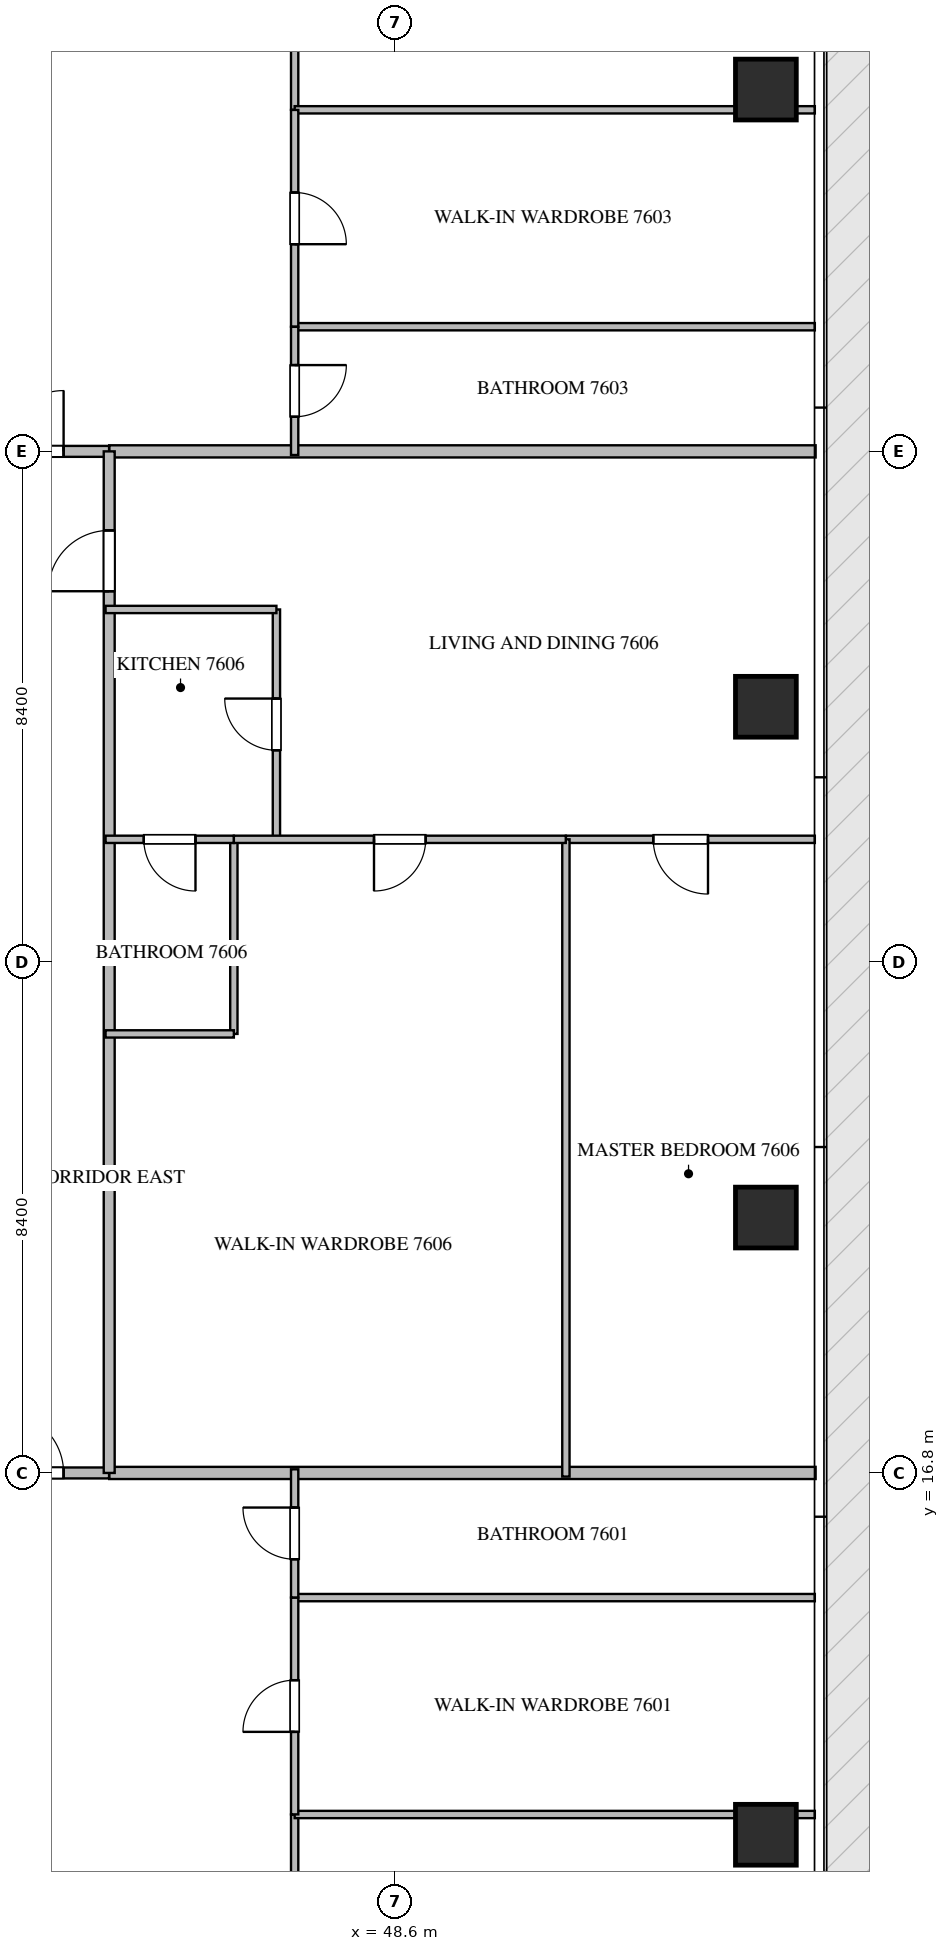
"""IFC4 building model, lengths in metres.
Left out: names, types, materials, properties, quantities, classifications, styles, units other than length and angle.
Written with IfcOpenShell. Run it as: python <this file> out.ifc"""

import sys

from ifc_helpers import new_model, si_unit, direction, frame, frame_2d, origin, origin_2d, place, context, subcontext, project, spatial, rectangle, extrude, source, transform, mapped, element, fill, save


model = new_model("IFC4")
c1 = context("Model", 3, precision=1e-05, world=origin(), true_north=direction((0.0, 1.0)))
c2 = subcontext(c1, "Body", "Model", "MODEL_VIEW")
j1 = project(units=[si_unit("LENGTHUNIT", "METRE"), si_unit("PLANEANGLEUNIT", "RADIAN")], contexts=[c1])
p1 = place(None, origin())
s1 = spatial("IfcSite", under=j1, at=p1, CompositionType="ELEMENT")
p2 = place(p1, origin())
s2 = spatial("IfcBuilding", under=s1, at=p2, CompositionType="ELEMENT")
p3 = place(p2, frame((0.0, 0.0, 305.6)))
s3 = spatial("IfcBuildingStorey", under=s2, at=p3, CompositionType="ELEMENT", Elevation=305.6)
m1 = source(origin(), c2, "Body", "SweptSolid", [
    extrude(rectangle(XDim=1.0, YDim=1.0, at=origin_2d()), origin(), (0.0, 0.0, 1.0), 4.05),
])
for number, where, z_axis, x_axis in (
    (1, (54.7, 10.85, -0.26), (0.0, 0.0, 1.0), (1.0, 0.0, 0.0)),
    (2, (54.7, 21.0, -0.26), (0.0, 0.0, 1.0), (1.0, 0.0, 0.0)),
    (3, (54.7, 29.4, -0.26), (0.0, 0.0, 1.0), (1.0, 0.0, 0.0)),
    (4, (54.7, 39.55, -0.26), (0.0, 0.0, 1.0), (1.0, 0.0, 0.0)),
):
    element("IfcColumn", number, at=place(p3, frame(where, z_axis=z_axis, x_axis=x_axis)), inside=s3, PredefinedType="COLUMN", context=c2, shape_type="MappedRepresentation", body=[
        mapped(m1, transform((0.0, 0.0, 0.0), scale=1.0)),
    ])
for number, where, z_axis, x_axis in (
    (5, (43.9, 16.8, 0.0), (0.0, 0.0, 1.0), (1.0, 0.0, 0.0)),
    (6, (43.9, 33.6, 0.0), (0.0, 0.0, 1.0), (1.0, 0.0, 0.0)),
):
    element("IfcWall", number, at=place(p3, frame(where, z_axis=z_axis, x_axis=x_axis)), inside=s3, PredefinedType="PARTITIONING", context=c2, shape_type="SweptSolid", body=[
        extrude(rectangle(XDim=11.618, YDim=0.2, at=frame_2d((5.809, 0.0))), origin(), (0.0, 0.0, 1.0), 3.79),
    ])
p4 = place(p3, frame((41.402, 16.8, 0.0), z_axis=(0.0, 0.0, 1.0), x_axis=(1.0, 0.0, 0.0)))
e7 = element("IfcWall", 7, at=p4, inside=s3, PredefinedType="PARTITIONING", context=c2, shape_type="SweptSolid", body=[
    extrude(rectangle(XDim=2.496, YDim=0.18, at=frame_2d((1.248, 0.0))), origin(), (0.0, 0.0, 1.0), 3.79),
])
p5 = place(p4, frame((0.748, 0.0, 0.0)))
e8 = element("IfcOpeningElement", 8, at=p5, cuts=e7, PredefinedType="OPENING", context=c2, shape_type="SweptSolid", body=[
    extrude(rectangle(XDim=1.0, YDim=2.15, at=frame_2d((0.5, 1.075))), frame((0.0, 0.1, 0.0), z_axis=(0.0, -1.0, 0.0), x_axis=(1.0, 0.0, 0.0)), (0.0, 0.0, 1.0), 0.2),
])
p6 = place(p3, frame((41.402, 33.6, 0.0), z_axis=(0.0, 0.0, 1.0), x_axis=(1.0, 0.0, 0.0)))
e9 = element("IfcWall", 9, at=p6, inside=s3, PredefinedType="PARTITIONING", context=c2, shape_type="SweptSolid", body=[
    extrude(rectangle(XDim=2.496, YDim=0.18, at=frame_2d((1.248, 0.0))), origin(), (0.0, 0.0, 1.0), 3.79),
])
p7 = place(p6, frame((0.748, 0.0, 0.0)))
e10 = element("IfcOpeningElement", 10, at=p7, cuts=e9, PredefinedType="OPENING", context=c2, shape_type="SweptSolid", body=[
    extrude(rectangle(XDim=1.0, YDim=2.15, at=frame_2d((0.5, 1.075))), frame((0.0, 0.1, 0.0), z_axis=(0.0, -1.0, 0.0), x_axis=(1.0, 0.0, 0.0)), (0.0, 0.0, 1.0), 0.2),
])
p8 = place(p3, frame((43.9, 16.8, 0.0), z_axis=(0.0, 0.0, 1.0), x_axis=(0.0, 1.0, 0.0)))
e11 = element("IfcWall", 11, at=p8, inside=s3, PredefinedType="PARTITIONING", context=c2, shape_type="SweptSolid", body=[
    extrude(rectangle(XDim=16.8, YDim=0.18, at=frame_2d((8.4, 0.0))), origin(), (0.0, 0.0, 1.0), 3.79),
])
p9 = place(p8, frame((14.5, 0.0, 0.0)))
e12 = element("IfcOpeningElement", 12, at=p9, cuts=e11, PredefinedType="OPENING", context=c2, shape_type="SweptSolid", body=[
    extrude(rectangle(XDim=1.0, YDim=2.15, at=frame_2d((0.5, 1.075))), frame((0.0, 0.1, 0.0), z_axis=(0.0, -1.0, 0.0), x_axis=(1.0, 0.0, 0.0)), (0.0, 0.0, 1.0), 0.2),
])
p10 = place(p3, frame((46.95, 2.495, 0.0), z_axis=(0.0, 0.0, 1.0), x_axis=(0.0, 1.0, 0.0)))
e13 = element("IfcWall", 13, at=p10, inside=s3, PredefinedType="PARTITIONING", context=c2, shape_type="SweptSolid", body=[
    extrude(rectangle(XDim=8.688, YDim=0.12, at=frame_2d((4.344, 0.0))), origin(), (0.0, 0.0, 1.0), 3.292),
])
p11 = place(p10, frame((4.283, 0.0, 0.0)))
e14 = element("IfcOpeningElement", 14, at=p11, cuts=e13, PredefinedType="OPENING", context=c2, shape_type="SweptSolid", body=[
    extrude(rectangle(XDim=0.9, YDim=2.1, at=frame_2d((0.45, 1.05))), frame((0.0, 0.07, 0.0), z_axis=(0.0, -1.0, 0.0), x_axis=(1.0, 0.0, 0.0)), (0.0, 0.0, 1.0), 0.14),
])
for number, where, z_axis, x_axis in (
    (15, (46.95, 11.183, 0.0), (0.0, 0.0, 1.0), (1.0, 0.0, 0.0)),
    (16, (46.95, 14.75, 0.0), (0.0, 0.0, 1.0), (1.0, 0.0, 0.0)),
):
    element("IfcWall", number, at=place(p3, frame(where, z_axis=z_axis, x_axis=x_axis)), inside=s3, PredefinedType="PARTITIONING", context=c2, shape_type="SweptSolid", body=[
        extrude(rectangle(XDim=8.555, YDim=0.12, at=frame_2d((4.277, 0.0))), origin(), (0.0, 0.0, 1.0), 3.79),
    ])
p12 = place(p3, frame((46.95, 11.185, 0.0), z_axis=(0.0, 0.0, 1.0), x_axis=(0.0, 1.0, 0.0)))
e17 = element("IfcWall", 17, at=p12, inside=s3, PredefinedType="PARTITIONING", context=c2, shape_type="SweptSolid", body=[
    extrude(rectangle(XDim=3.565, YDim=0.12, at=frame_2d((1.782, 0.0))), origin(), (0.0, 0.0, 1.0), 3.372),
])
p13 = place(p12, frame((1.357, 0.0, 0.0)))
e18 = element("IfcOpeningElement", 18, at=p13, cuts=e17, PredefinedType="OPENING", context=c2, shape_type="SweptSolid", body=[
    extrude(rectangle(XDim=0.85, YDim=2.1, at=frame_2d((0.425, 1.05))), frame((0.0, 0.07, 0.0), z_axis=(0.0, -1.0, 0.0), x_axis=(1.0, 0.0, 0.0)), (0.0, 0.0, 1.0), 0.14),
])
p14 = place(p3, frame((46.95, 14.752, 0.0), z_axis=(0.0, 0.0, 1.0), x_axis=(0.0, 1.0, 0.0)))
e19 = element("IfcWall", 19, at=p14, inside=s3, PredefinedType="PARTITIONING", context=c2, shape_type="SweptSolid", body=[
    extrude(rectangle(XDim=2.108, YDim=0.12, at=frame_2d((1.054, 0.0))), origin(), (0.0, 0.0, 1.0), 3.372),
])
p15 = place(p14, frame((0.629, 0.0, 0.0)))
e20 = element("IfcOpeningElement", 20, at=p15, cuts=e19, PredefinedType="OPENING", context=c2, shape_type="SweptSolid", body=[
    extrude(rectangle(XDim=0.85, YDim=2.1, at=frame_2d((0.425, 1.05))), frame((0.0, 0.07, 0.0), z_axis=(0.0, -1.0, 0.0), x_axis=(1.0, 0.0, 0.0)), (0.0, 0.0, 1.0), 0.14),
])
p16 = place(p3, frame((46.95, 47.905, 0.0), z_axis=(0.0, 0.0, 1.0), x_axis=(0.0, -1.0, 0.0)))
e21 = element("IfcWall", 21, at=p16, inside=s3, PredefinedType="PARTITIONING", context=c2, shape_type="SweptSolid", body=[
    extrude(rectangle(XDim=8.688, YDim=0.12, at=frame_2d((4.344, 0.0))), origin(), (0.0, 0.0, 1.0), 3.292),
])
p17 = place(p16, frame((4.283, 0.0, 0.0)))
e22 = element("IfcOpeningElement", 22, at=p17, cuts=e21, PredefinedType="OPENING", context=c2, shape_type="SweptSolid", body=[
    extrude(rectangle(XDim=0.9, YDim=2.1, at=frame_2d((0.45, 1.05))), frame((0.0, 0.07, 0.0), z_axis=(0.0, -1.0, 0.0), x_axis=(1.0, 0.0, 0.0)), (0.0, 0.0, 1.0), 0.14),
])
for number, where, z_axis, x_axis in (
    (23, (46.95, 39.217, 0.0), (0.0, 0.0, 1.0), (1.0, 0.0, 0.0)),
    (24, (46.95, 35.65, 0.0), (0.0, 0.0, 1.0), (1.0, 0.0, 0.0)),
):
    element("IfcWall", number, at=place(p3, frame(where, z_axis=z_axis, x_axis=x_axis)), inside=s3, PredefinedType="PARTITIONING", context=c2, shape_type="SweptSolid", body=[
        extrude(rectangle(XDim=8.555, YDim=0.12, at=frame_2d((4.277, 0.0))), origin(), (0.0, 0.0, 1.0), 3.79),
    ])
p18 = place(p3, frame((46.95, 39.215, 0.0), z_axis=(0.0, 0.0, 1.0), x_axis=(0.0, -1.0, 0.0)))
e25 = element("IfcWall", 25, at=p18, inside=s3, PredefinedType="PARTITIONING", context=c2, shape_type="SweptSolid", body=[
    extrude(rectangle(XDim=3.565, YDim=0.12, at=frame_2d((1.783, 0.0))), origin(), (0.0, 0.0, 1.0), 3.372),
])
p19 = place(p18, frame((1.358, 0.0, 0.0)))
e26 = element("IfcOpeningElement", 26, at=p19, cuts=e25, PredefinedType="OPENING", context=c2, shape_type="SweptSolid", body=[
    extrude(rectangle(XDim=0.85, YDim=2.1, at=frame_2d((0.425, 1.05))), frame((0.0, 0.07, 0.0), z_axis=(0.0, -1.0, 0.0), x_axis=(1.0, 0.0, 0.0)), (0.0, 0.0, 1.0), 0.14),
])
p20 = place(p3, frame((46.95, 35.648, 0.0), z_axis=(0.0, 0.0, 1.0), x_axis=(0.0, -1.0, 0.0)))
e27 = element("IfcWall", 27, at=p20, inside=s3, PredefinedType="PARTITIONING", context=c2, shape_type="SweptSolid", body=[
    extrude(rectangle(XDim=2.108, YDim=0.12, at=frame_2d((1.054, 0.0))), origin(), (0.0, 0.0, 1.0), 3.372),
])
p21 = place(p20, frame((0.629, 0.0, 0.0)))
e28 = element("IfcOpeningElement", 28, at=p21, cuts=e27, PredefinedType="OPENING", context=c2, shape_type="SweptSolid", body=[
    extrude(rectangle(XDim=0.85, YDim=2.1, at=frame_2d((0.425, 1.05))), frame((0.0, 0.07, 0.0), z_axis=(0.0, -1.0, 0.0), x_axis=(1.0, 0.0, 0.0)), (0.0, 0.0, 1.0), 0.14),
])
p22 = place(p3, frame((46.65, 27.22, 0.0), z_axis=(0.0, 0.0, 1.0), x_axis=(0.0, 1.0, 0.0)))
e29 = element("IfcWall", 29, at=p22, inside=s3, PredefinedType="PARTITIONING", context=c2, shape_type="SweptSolid", body=[
    extrude(rectangle(XDim=3.78, YDim=0.12, at=frame_2d((1.89, 0.0))), origin(), (0.0, 0.0, 1.0), 3.79),
])
p23 = place(p22, frame((1.465, 0.0, 0.0)))
e30 = element("IfcOpeningElement", 30, at=p23, cuts=e29, PredefinedType="OPENING", context=c2, shape_type="SweptSolid", body=[
    extrude(rectangle(XDim=0.85, YDim=2.1, at=frame_2d((0.425, 1.05))), frame((0.0, 0.07, 0.0), z_axis=(0.0, -1.0, 0.0), x_axis=(1.0, 0.0, 0.0)), (0.0, 0.0, 1.0), 0.14),
])
p24 = place(p3, frame((46.65, 31.0, 0.0), z_axis=(0.0, 0.0, 1.0), x_axis=(-1.0, 0.0, 0.0)))
e31 = element("IfcWall", 31, at=p24, inside=s3, PredefinedType="PARTITIONING", context=c2, shape_type="SweptSolid", body=[
    extrude(rectangle(XDim=2.81, YDim=0.12, at=frame_2d((1.405, 0.0))), origin(), (0.0, 0.0, 1.0), 3.79),
])
p25 = place(p3, frame((55.505, 27.22, 0.0), z_axis=(0.0, 0.0, 1.0), x_axis=(-1.0, 0.0, 0.0)))
e32 = element("IfcWall", 32, at=p25, inside=s3, PredefinedType="PARTITIONING", context=c2, shape_type="SweptSolid", body=[
    extrude(rectangle(XDim=4.094, YDim=0.12, at=frame_2d((2.047, 0.0))), origin(), (0.0, 0.0, 1.0), 3.79),
])
p26 = place(p25, frame((1.757, 0.0, 0.0)))
e33 = element("IfcOpeningElement", 33, at=p26, cuts=e32, PredefinedType="OPENING", context=c2, shape_type="SweptSolid", body=[
    extrude(rectangle(XDim=0.9, YDim=2.1, at=frame_2d((0.45, 1.05))), frame((0.0, 0.07, 0.0), z_axis=(0.0, -1.0, 0.0), x_axis=(1.0, 0.0, 0.0)), (0.0, 0.0, 1.0), 0.14),
])
p27 = place(p3, frame((51.411, 16.74, 0.0), z_axis=(0.0, 0.0, 1.0), x_axis=(0.0, 1.0, 0.0)))
e34 = element("IfcWall", 34, at=p27, inside=s3, PredefinedType="PARTITIONING", context=c2, shape_type="SweptSolid", body=[
    extrude(rectangle(XDim=10.48, YDim=0.12, at=frame_2d((5.24, 0.0))), origin(), (0.0, 0.0, 1.0), 3.79),
])
p28 = place(p3, frame((45.95, 24.02, 0.0), z_axis=(0.0, 0.0, 1.0), x_axis=(0.0, 1.0, 0.0)))
e35 = element("IfcWall", 35, at=p28, inside=s3, PredefinedType="PARTITIONING", context=c2, shape_type="SweptSolid", body=[
    extrude(rectangle(XDim=3.2, YDim=0.12, at=frame_2d((1.6, 0.0))), origin(), (0.0, 0.0, 1.0), 3.79),
])
p29 = place(p3, frame((45.95, 24.02, 0.0), z_axis=(0.0, 0.0, 1.0), x_axis=(-1.0, 0.0, 0.0)))
e36 = element("IfcWall", 36, at=p29, inside=s3, PredefinedType="PARTITIONING", context=c2, shape_type="SweptSolid", body=[
    extrude(rectangle(XDim=2.11, YDim=0.12, at=frame_2d((1.055, 0.0))), origin(), (0.0, 0.0, 1.0), 3.79),
])
p30 = place(p3, frame((51.409, 27.22, 0.0), z_axis=(0.0, 0.0, 1.0), x_axis=(-1.0, 0.0, 0.0)))
e37 = element("IfcWall", 37, at=p30, inside=s3, PredefinedType="PARTITIONING", context=c2, shape_type="SweptSolid", body=[
    extrude(rectangle(XDim=5.459, YDim=0.12, at=frame_2d((2.729, 0.0))), origin(), (0.0, 0.0, 1.0), 3.79),
])
p31 = place(p30, frame((2.304, 0.0, 0.0)))
e38 = element("IfcOpeningElement", 38, at=p31, cuts=e37, PredefinedType="OPENING", context=c2, shape_type="SweptSolid", body=[
    extrude(rectangle(XDim=0.85, YDim=2.1, at=frame_2d((0.425, 1.05))), frame((0.0, 0.07, 0.0), z_axis=(0.0, -1.0, 0.0), x_axis=(1.0, 0.0, 0.0)), (0.0, 0.0, 1.0), 0.14),
])
p32 = place(p3, frame((45.948, 27.22, 0.0), z_axis=(0.0, 0.0, 1.0), x_axis=(-1.0, 0.0, 0.0)))
e39 = element("IfcWall", 39, at=p32, inside=s3, PredefinedType="PARTITIONING", context=c2, shape_type="SweptSolid", body=[
    extrude(rectangle(XDim=2.108, YDim=0.12, at=frame_2d((1.054, 0.0))), origin(), (0.0, 0.0, 1.0), 3.79),
])
p33 = place(p32, frame((0.629, 0.0, 0.0)))
e40 = element("IfcOpeningElement", 40, at=p33, cuts=e39, PredefinedType="OPENING", context=c2, shape_type="SweptSolid", body=[
    extrude(rectangle(XDim=0.85, YDim=2.1, at=frame_2d((0.425, 1.05))), frame((0.0, 0.07, 0.0), z_axis=(0.0, -1.0, 0.0), x_axis=(1.0, 0.0, 0.0)), (0.0, 0.0, 1.0), 0.14),
])
m2 = source(origin(), c2, "Body", "SweptSolid", [
    extrude(rectangle(XDim=1.0, YDim=2.15, at=frame_2d((0.5, 1.075))), frame((0.0, 0.025, 0.0), z_axis=(0.0, -1.0, 0.0), x_axis=(1.0, 0.0, 0.0)), (0.0, 0.0, 1.0), 0.05),
])
p34 = place(p5, origin())
e41 = element("IfcDoor", 41, at=p34, inside=s3, OperationType="SINGLE_SWING_LEFT", PredefinedType="DOOR", context=c2, shape_type="MappedRepresentation", body=[
    mapped(m2, transform((0.0, 0.0, 0.0), scale=1.0)),
])
fill(e8, e41)
p35 = place(p7, origin())
e42 = element("IfcDoor", 42, at=p35, inside=s3, OperationType="SINGLE_SWING_RIGHT", PredefinedType="DOOR", context=c2, shape_type="MappedRepresentation", body=[
    mapped(m2, transform((0.0, 0.0, 0.0), scale=1.0)),
])
fill(e10, e42)
p36 = place(p9, origin())
e43 = element("IfcDoor", 43, at=p36, inside=s3, OperationType="SINGLE_SWING_LEFT", PredefinedType="DOOR", context=c2, shape_type="MappedRepresentation", body=[
    mapped(m2, transform((0.0, 0.0, 0.0), scale=1.0)),
])
fill(e12, e43)
m3 = source(origin(), c2, "Body", "SweptSolid", [
    extrude(rectangle(XDim=0.85, YDim=2.1, at=frame_2d((0.425, 1.05))), frame((0.0, 0.025, 0.0), z_axis=(0.0, -1.0, 0.0), x_axis=(1.0, 0.0, 0.0)), (0.0, 0.0, 1.0), 0.05),
])
p37 = place(p13, origin())
e44 = element("IfcDoor", 44, at=p37, inside=s3, OperationType="SINGLE_SWING_LEFT", PredefinedType="DOOR", context=c2, shape_type="MappedRepresentation", body=[
    mapped(m3, transform((0.0, 0.0, 0.0), scale=1.0)),
])
fill(e18, e44)
p38 = place(p15, origin())
e45 = element("IfcDoor", 45, at=p38, inside=s3, OperationType="SINGLE_SWING_RIGHT", PredefinedType="DOOR", context=c2, shape_type="MappedRepresentation", body=[
    mapped(m3, transform((0.0, 0.0, 0.0), scale=1.0)),
])
fill(e20, e45)
p39 = place(p19, origin())
e46 = element("IfcDoor", 46, at=p39, inside=s3, OperationType="SINGLE_SWING_RIGHT", PredefinedType="DOOR", context=c2, shape_type="MappedRepresentation", body=[
    mapped(m3, transform((0.0, 0.0, 0.0), scale=1.0)),
])
fill(e26, e46)
p40 = place(p21, origin())
e47 = element("IfcDoor", 47, at=p40, inside=s3, OperationType="SINGLE_SWING_LEFT", PredefinedType="DOOR", context=c2, shape_type="MappedRepresentation", body=[
    mapped(m3, transform((0.0, 0.0, 0.0), scale=1.0)),
])
fill(e28, e47)
p41 = place(p23, origin())
e48 = element("IfcDoor", 48, at=p41, inside=s3, OperationType="SINGLE_SWING_RIGHT", PredefinedType="DOOR", context=c2, shape_type="MappedRepresentation", body=[
    mapped(m3, transform((0.0, 0.0, 0.0), scale=1.0)),
])
fill(e30, e48)
m4 = source(origin(), c2, "Body", "SweptSolid", [
    extrude(rectangle(XDim=0.9, YDim=2.1, at=frame_2d((0.45, 1.05))), frame((0.0, 0.025, 0.0), z_axis=(0.0, -1.0, 0.0), x_axis=(1.0, 0.0, 0.0)), (0.0, 0.0, 1.0), 0.05),
])
p42 = place(p26, origin())
e49 = element("IfcDoor", 49, at=p42, inside=s3, OperationType="SINGLE_SWING_LEFT", PredefinedType="DOOR", context=c2, shape_type="MappedRepresentation", body=[
    mapped(m4, transform((0.0, 0.0, 0.0), scale=1.0)),
])
fill(e33, e49)
p43 = place(p31, origin())
e50 = element("IfcDoor", 50, at=p43, inside=s3, OperationType="SINGLE_SWING_RIGHT", PredefinedType="DOOR", context=c2, shape_type="MappedRepresentation", body=[
    mapped(m3, transform((0.0, 0.0, 0.0), scale=1.0)),
])
fill(e38, e50)
p44 = place(p33, origin())
e51 = element("IfcDoor", 51, at=p44, inside=s3, OperationType="SINGLE_SWING_LEFT", PredefinedType="DOOR", context=c2, shape_type="MappedRepresentation", body=[
    mapped(m3, transform((0.0, 0.0, 0.0), scale=1.0)),
])
fill(e40, e51)
save(model, sys.argv[1])
